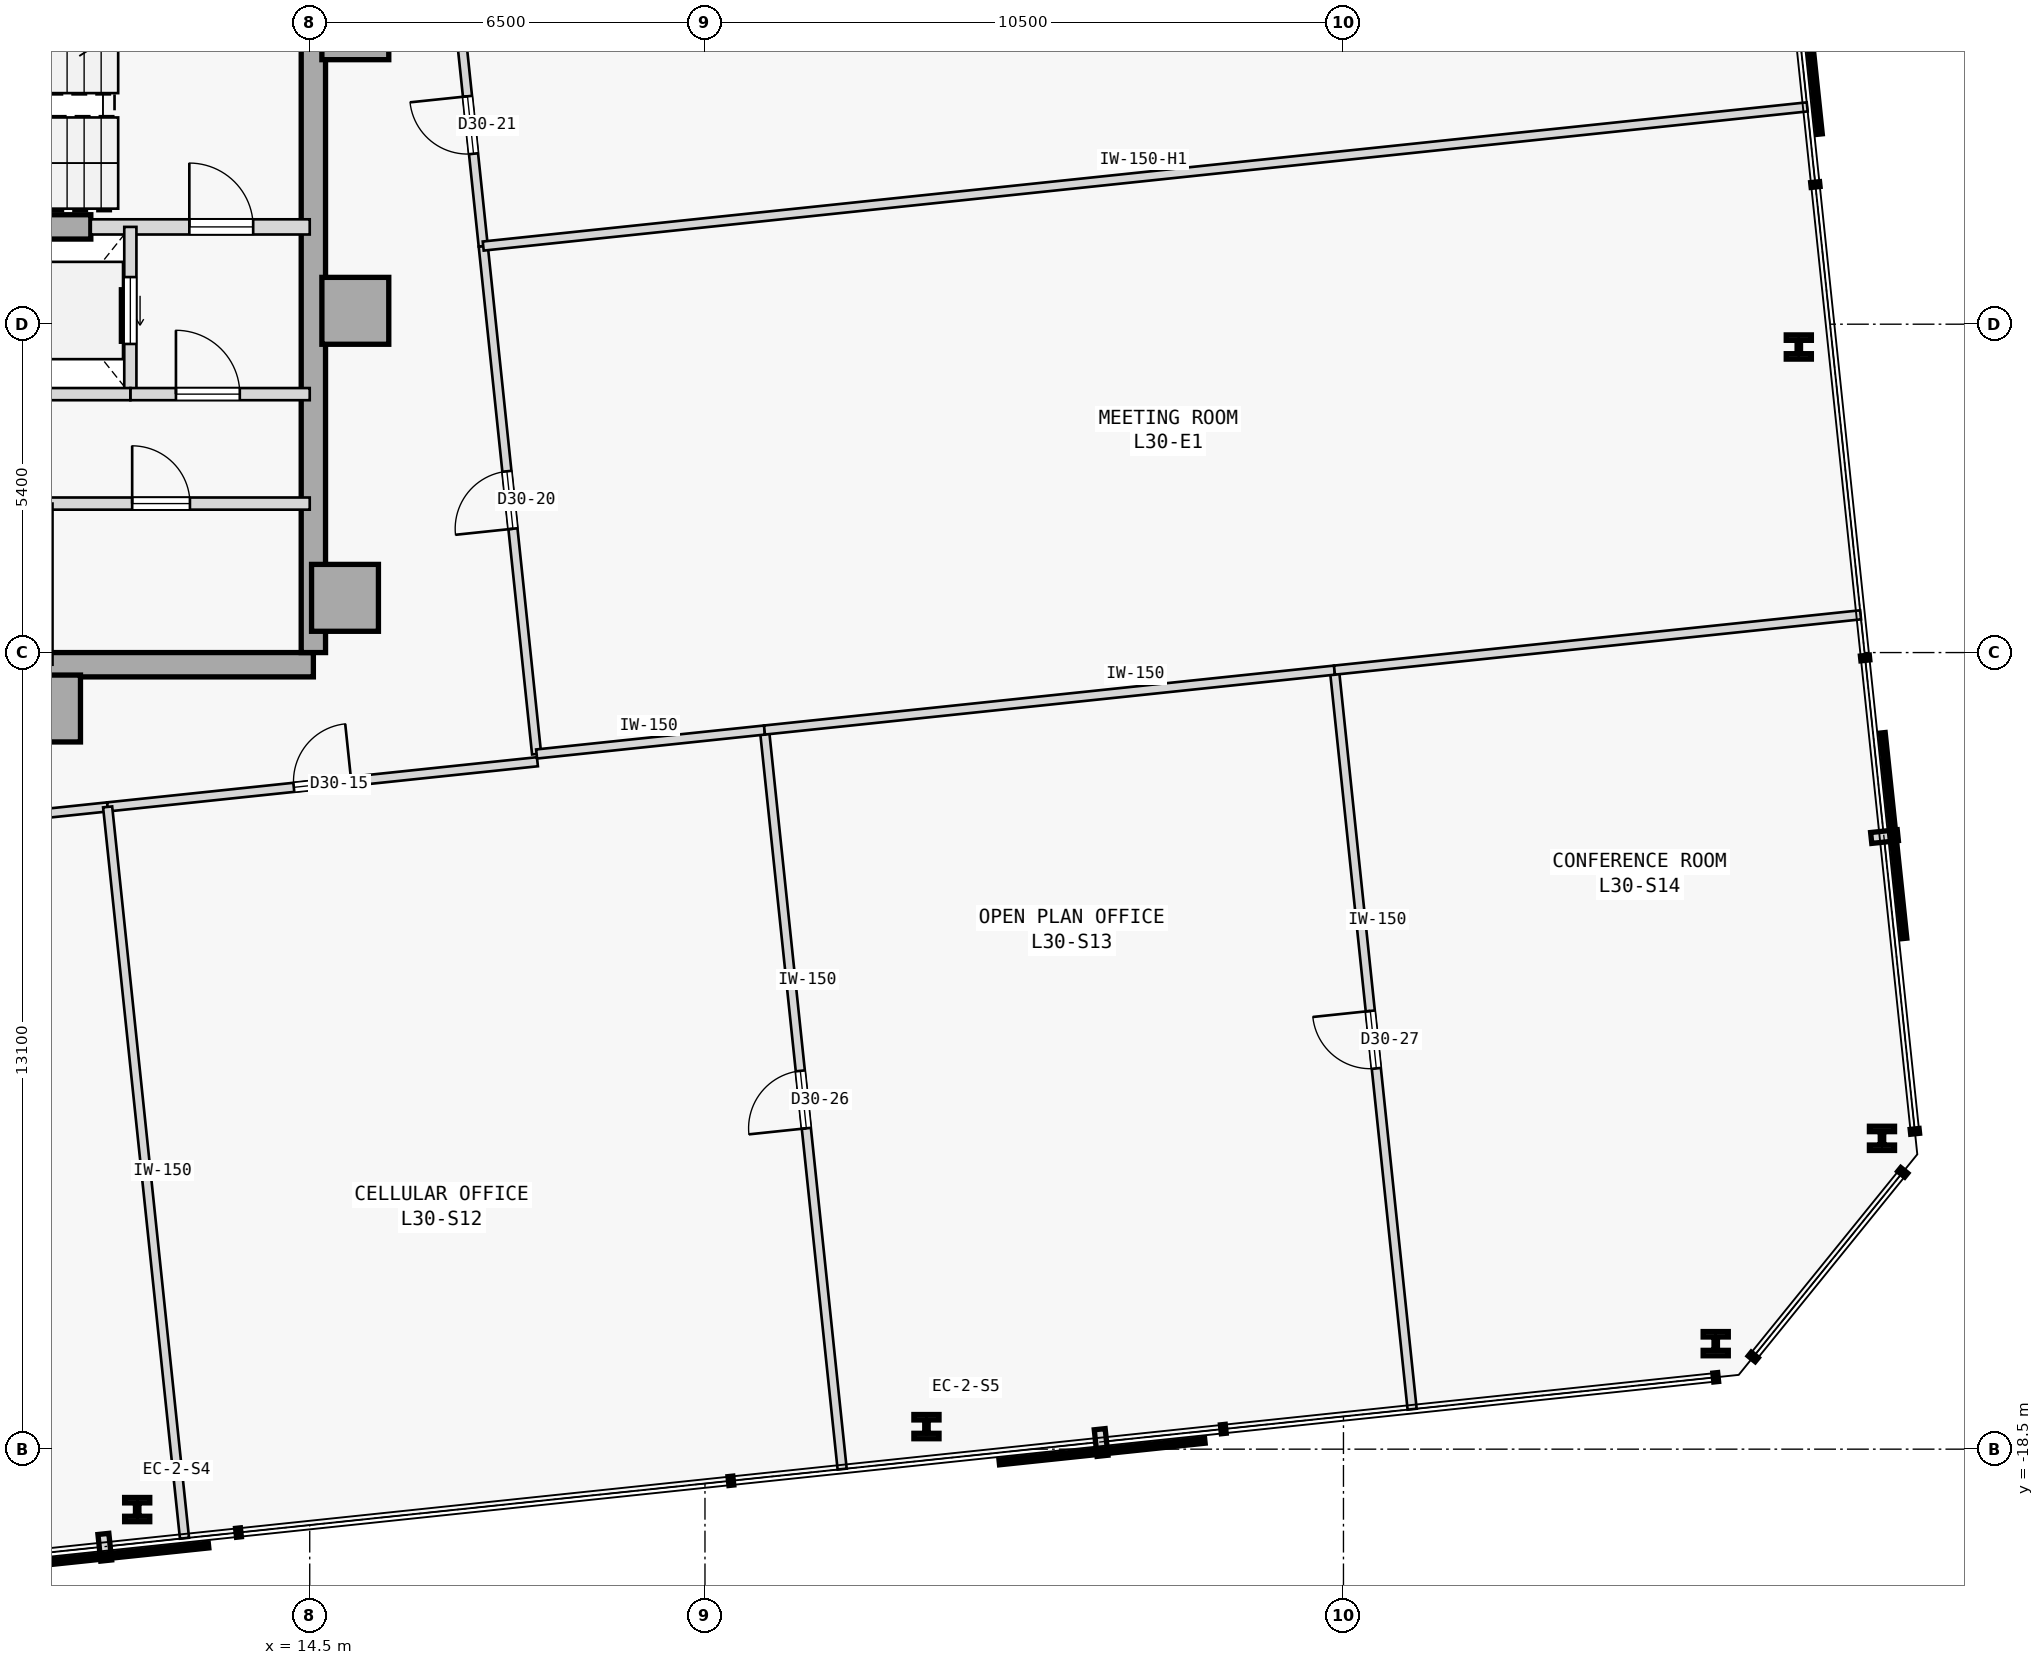
"""IFC4 building model, lengths in metres.
Left out: names, types, materials, properties, quantities, classifications, styles, units other than length and angle.
Written with IfcOpenShell. Run it as: python <this file> out.ifc"""

import sys

from ifc_helpers import new_model, si_unit, direction, frame, frame_2d, origin, origin_2d, place, context, subcontext, project, spatial, rectangle, i_section, extrude, element, fill, save


model = new_model("IFC4")
c1 = context("Model", 3, precision=1e-05, world=origin(), true_north=direction((0.0, 1.0)))
c2 = subcontext(c1, "Body", "Model", "MODEL_VIEW")
j1 = project(units=[si_unit("LENGTHUNIT", "METRE"), si_unit("PLANEANGLEUNIT", "RADIAN")], contexts=[c1])
p1 = place(None, origin())
s1 = spatial("IfcSite", under=j1, at=p1, CompositionType="ELEMENT")
p2 = place(p1, origin())
s2 = spatial("IfcBuilding", under=s1, at=p2, CompositionType="ELEMENT")
p3 = place(p2, frame((0.0, 0.0, 120.7)))
s3 = spatial("IfcBuildingStorey", under=s2, at=p3, CompositionType="ELEMENT", Elevation=120.7)
for number, where, z_axis, x_axis in (
    (1, (15.25, 4.9, 0.0), (0.0, 0.0, 1.0), (1.0, 0.0, 0.0)),
    (2, (15.25, 0.22, 0.0), (0.0, 0.0, 1.0), (1.0, 0.0, 0.0)),
    (3, (15.08, -4.5, 0.0), (0.0, 0.0, 1.0), (1.0, 0.0, 0.0)),
    (4, (10.18, -6.32, 0.0), (0.0, 0.0, 1.0), (1.0, 0.0, 0.0)),
):
    element("IfcColumn", number, at=place(p3, frame(where, z_axis=z_axis, x_axis=x_axis)), inside=s3, PredefinedType="COLUMN", context=c2, shape_type="SweptSolid", body=[
        extrude(rectangle(XDim=1.1, YDim=1.1, at=origin_2d()), origin(), (0.0, 0.0, 1.0), 3.7),
    ])
p4 = place(p3, frame((3.7, -5.6, 0.0), z_axis=(0.0, 0.0, 1.0), x_axis=(1.0, 0.0, 0.0)))
e5 = element("IfcWall", 5, at=p4, inside=s3, PredefinedType="SHEAR", context=c2, shape_type="SweptSolid", body=[
    extrude(rectangle(XDim=10.86, YDim=0.4, at=frame_2d((5.43, 0.0))), origin(), (0.0, 0.0, 1.0), 3.475),
])
p5 = place(p3, frame((14.56, -5.4, 0.0), z_axis=(0.0, 0.0, 1.0), x_axis=(0.0, 1.0, 0.0)))
e6 = element("IfcWall", 6, at=p5, inside=s3, PredefinedType="SHEAR", context=c2, shape_type="SweptSolid", body=[
    extrude(rectangle(XDim=10.8, YDim=0.4, at=frame_2d((5.4, 0.0))), origin(), (0.0, 0.0, 1.0), 3.475),
])
p6 = place(p3, frame((5.75, 1.6, 0.0), z_axis=(0.0, 0.0, 1.0), x_axis=(1.0, 0.0, 0.0)))
e7 = element("IfcWall", 7, at=p6, inside=s3, PredefinedType="SHEAR", context=c2, shape_type="SweptSolid", body=[
    extrude(rectangle(XDim=5.15, YDim=0.4, at=frame_2d((2.575, 0.0))), origin(), (0.0, 0.0, 1.0), 3.475),
])
for number, where, z_axis, x_axis in (
    (8, (11.663, -19.494, 0.0), (0.0, 0.0, 1.0), (1.0, 0.0, 0.0)),
    (9, (24.642, -18.129, 0.0), (0.0, 0.0, 1.0), (1.0, 0.0, 0.0)),
    (10, (37.622, -16.765, 0.0), (0.0, 0.0, 1.0), (1.0, 0.0, 0.0)),
    (11, (40.356, -13.389, 0.0), (0.0, 0.0, 1.0), (1.0, 0.0, 0.0)),
    (12, (38.988, -0.375, 0.0), (0.0, 0.0, 1.0), (1.0, 0.0, 0.0)),
):
    element("IfcColumn", number, at=place(p3, frame(where, z_axis=z_axis, x_axis=x_axis)), inside=s3, PredefinedType="COLUMN", context=c2, shape_type="SweptSolid", body=[
        extrude(i_section(OverallWidth=0.413, OverallDepth=0.398, WebThickness=0.056, FlangeThickness=0.089, FilletRadius=0.015, at=origin_2d()), origin(), (0.0, 0.0, 1.0), 3.7),
    ])
p7 = place(p3, frame((10.9, 1.6, 0.0), z_axis=(0.0, 0.0, 1.0), x_axis=(1.0, 0.0, 0.0)))
e13 = element("IfcWall", 13, at=p7, inside=s3, PredefinedType="STANDARD", context=c2, shape_type="SweptSolid", body=[
    extrude(rectangle(XDim=3.6, YDim=0.25, at=frame_2d((1.8, 0.0))), origin(), (0.0, 0.0, 1.0), 3.475),
])
p8 = place(p7, frame((1.62, 0.0, 0.0)))
e14 = element("IfcOpeningElement", 14, at=p8, cuts=e13, PredefinedType="OPENING", context=c2, shape_type="SweptSolid", body=[
    extrude(rectangle(XDim=1.05, YDim=2.15, at=frame_2d((0.525, 1.075))), frame((0.0, 0.135, 0.0), z_axis=(0.0, -1.0, 0.0), x_axis=(1.0, 0.0, 0.0)), (0.0, 0.0, 1.0), 0.27),
])
p9 = place(p3, frame((11.55, -1.15, 0.0), z_axis=(0.0, 0.0, 1.0), x_axis=(0.0, 1.0, 0.0)))
e15 = element("IfcWall", 15, at=p9, inside=s3, PredefinedType="STANDARD", context=c2, shape_type="SweptSolid", body=[
    extrude(rectangle(XDim=2.75, YDim=0.2, at=frame_2d((1.375, 0.0))), origin(), (0.0, 0.0, 1.0), 3.475),
])
p10 = place(p9, frame((0.825, 0.0, 0.0)))
e16 = element("IfcOpeningElement", 16, at=p10, cuts=e15, PredefinedType="OPENING", context=c2, shape_type="SweptSolid", body=[
    extrude(rectangle(XDim=1.1, YDim=2.15, at=frame_2d((0.55, 1.075))), frame((0.0, 0.11, 0.0), z_axis=(0.0, -1.0, 0.0), x_axis=(1.0, 0.0, 0.0)), (0.0, 0.0, 1.0), 0.22),
])
p11 = place(p3, frame((11.55, -1.15, 0.0), z_axis=(0.0, 0.0, 1.0), x_axis=(1.0, 0.0, 0.0)))
e17 = element("IfcWall", 17, at=p11, inside=s3, PredefinedType="STANDARD", context=c2, shape_type="SweptSolid", body=[
    extrude(rectangle(XDim=2.95, YDim=0.2, at=frame_2d((1.475, 0.0))), origin(), (0.0, 0.0, 1.0), 3.475),
])
p12 = place(p11, frame((0.75, 0.0, 0.0)))
e18 = element("IfcOpeningElement", 18, at=p12, cuts=e17, PredefinedType="OPENING", context=c2, shape_type="SweptSolid", body=[
    extrude(rectangle(XDim=1.05, YDim=2.18, at=frame_2d((0.525, 1.09))), frame((0.0, 0.11, 0.0), z_axis=(0.0, -1.0, 0.0), x_axis=(1.0, 0.0, 0.0)), (0.0, 0.0, 1.0), 0.22),
])
p13 = place(p3, frame((9.35, -1.15, 0.0), z_axis=(0.0, 0.0, 1.0), x_axis=(1.0, 0.0, 0.0)))
e19 = element("IfcWall", 19, at=p13, inside=s3, PredefinedType="STANDARD", context=c2, shape_type="SweptSolid", body=[
    extrude(rectangle(XDim=2.2, YDim=0.2, at=frame_2d((1.1, 0.0))), origin(), (0.0, 0.0, 1.0), 3.475),
])
p14 = place(p3, frame((3.7, -2.95, 0.0), z_axis=(0.0, 0.0, 1.0), x_axis=(1.0, 0.0, 0.0)))
e20 = element("IfcWall", 20, at=p14, inside=s3, PredefinedType="STANDARD", context=c2, shape_type="SweptSolid", body=[
    extrude(rectangle(XDim=10.8, YDim=0.2, at=frame_2d((5.4, 0.0))), origin(), (0.0, 0.0, 1.0), 3.475),
])
p15 = place(p14, frame((2.69, 0.0, 0.0)))
e21 = element("IfcOpeningElement", 21, at=p15, cuts=e20, PredefinedType="OPENING", context=c2, shape_type="SweptSolid", body=[
    extrude(rectangle(XDim=1.1, YDim=2.15, at=frame_2d((0.55, 1.075))), frame((0.0, 0.11, 0.0), z_axis=(0.0, -1.0, 0.0), x_axis=(1.0, 0.0, 0.0)), (0.0, 0.0, 1.0), 0.22),
])
p16 = place(p14, frame((4.85, 0.0, 0.0)))
e22 = element("IfcOpeningElement", 22, at=p16, cuts=e20, PredefinedType="OPENING", context=c2, shape_type="SweptSolid", body=[
    extrude(rectangle(XDim=1.1, YDim=2.15, at=frame_2d((0.55, 1.075))), frame((0.0, 0.11, 0.0), z_axis=(0.0, -1.0, 0.0), x_axis=(1.0, 0.0, 0.0)), (0.0, 0.0, 1.0), 0.22),
])
p17 = place(p14, frame((7.88, 0.0, 0.0)))
e23 = element("IfcOpeningElement", 23, at=p17, cuts=e20, PredefinedType="OPENING", context=c2, shape_type="SweptSolid", body=[
    extrude(rectangle(XDim=0.95, YDim=2.15, at=frame_2d((0.475, 1.075))), frame((0.0, 0.11, 0.0), z_axis=(0.0, -1.0, 0.0), x_axis=(1.0, 0.0, 0.0)), (0.0, 0.0, 1.0), 0.22),
])
p18 = place(p3, frame((-0.36, -9.151, 0.0), z_axis=(0.0, 0.0, 1.0), x_axis=(0.994520780406, 0.10453907088, 0.0)))
e24 = element("IfcWall", 24, at=p18, inside=s3, PredefinedType="PARTITIONING", context=c2, shape_type="SweptSolid", body=[
    extrude(rectangle(XDim=11.6, YDim=0.15, at=frame_2d((5.8, 0.0))), origin(), (0.0, 0.0, 1.0), 3.475),
])
p19 = place(p18, frame((5.325, 0.0, 0.0)))
e25 = element("IfcOpeningElement", 25, at=p19, cuts=e24, PredefinedType="OPENING", context=c2, shape_type="SweptSolid", body=[
    extrude(rectangle(XDim=0.95, YDim=2.15, at=frame_2d((0.475, 1.075))), frame((0.0, 0.085, 0.0), z_axis=(0.0, -1.0, 0.0), x_axis=(1.0, 0.0, 0.0)), (0.0, 0.0, 1.0), 0.17),
])
p20 = place(p3, frame((11.177, -7.938, 0.0), z_axis=(0.0, 0.0, 1.0), x_axis=(0.994525011473, 0.104498811264, 0.0)))
e26 = element("IfcWall", 26, at=p20, inside=s3, PredefinedType="PARTITIONING", context=c2, shape_type="SweptSolid", body=[
    extrude(rectangle(XDim=7.107, YDim=0.15, at=frame_2d((3.553, 0.0))), origin(), (0.0, 0.0, 1.0), 3.475),
])
p21 = place(p20, frame((3.079, 0.0, 0.0)))
e27 = element("IfcOpeningElement", 27, at=p21, cuts=e26, PredefinedType="OPENING", context=c2, shape_type="SweptSolid", body=[
    extrude(rectangle(XDim=0.95, YDim=2.15, at=frame_2d((0.475, 1.075))), frame((0.0, 0.085, 0.0), z_axis=(0.0, -1.0, 0.0), x_axis=(1.0, 0.0, 0.0)), (0.0, 0.0, 1.0), 0.17),
])
p22 = place(p3, frame((18.231, -7.068, 0.0), z_axis=(0.0, 0.0, 1.0), x_axis=(-0.104527419485, 0.994522005074, 0.0)))
e28 = element("IfcWall", 28, at=p22, inside=s3, PredefinedType="PARTITIONING", context=c2, shape_type="SweptSolid", body=[
    extrude(rectangle(XDim=8.399, YDim=0.15, at=frame_2d((4.199, 0.0))), origin(), (0.0, 0.0, 1.0), 3.475),
])
p23 = place(p22, frame((3.725, 0.0, 0.0)))
e29 = element("IfcOpeningElement", 29, at=p23, cuts=e28, PredefinedType="OPENING", context=c2, shape_type="SweptSolid", body=[
    extrude(rectangle(XDim=0.95, YDim=2.15, at=frame_2d((0.475, 1.075))), frame((0.0, 0.085, 0.0), z_axis=(0.0, -1.0, 0.0), x_axis=(1.0, 0.0, 0.0)), (0.0, 0.0, 1.0), 0.17),
])
p24 = place(p3, frame((17.353, 1.285, 0.0), z_axis=(0.0, 0.0, 1.0), x_axis=(-0.104524753323, 0.994522285292, 0.0)))
e30 = element("IfcWall", 30, at=p24, inside=s3, PredefinedType="PARTITIONING", context=c2, shape_type="SweptSolid", body=[
    extrude(rectangle(XDim=5.718, YDim=0.15, at=frame_2d((2.859, 0.0))), origin(), (0.0, 0.0, 1.0), 3.475),
])
p25 = place(p24, frame((1.526, 0.0, 0.0)))
e31 = element("IfcOpeningElement", 31, at=p25, cuts=e30, PredefinedType="OPENING", context=c2, shape_type="SweptSolid", body=[
    extrude(rectangle(XDim=0.95, YDim=2.15, at=frame_2d((0.475, 1.075))), frame((0.0, 0.085, 0.0), z_axis=(0.0, -1.0, 0.0), x_axis=(1.0, 0.0, 0.0)), (0.0, 0.0, 1.0), 0.17),
])
p26 = place(p3, frame((12.441, -19.965, 0.0), z_axis=(0.0, 0.0, 1.0), x_axis=(-0.104535555083, 0.994521149963, 0.0)))
e32 = element("IfcWall", 32, at=p26, inside=s3, PredefinedType="PARTITIONING", context=c2, shape_type="SweptSolid", body=[
    extrude(rectangle(XDim=12.093, YDim=0.15, at=frame_2d((6.046, 0.0))), origin(), (0.0, 0.0, 1.0), 3.475),
])
p27 = place(p3, frame((23.256, -18.828, 0.0), z_axis=(0.0, 0.0, 1.0), x_axis=(-0.104540236679, 0.994520657862, 0.0)))
e33 = element("IfcWall", 33, at=p27, inside=s3, PredefinedType="PARTITIONING", context=c2, shape_type="SweptSolid", body=[
    extrude(rectangle(XDim=12.221, YDim=0.15, at=frame_2d((6.11, 0.0))), origin(), (0.0, 0.0, 1.0), 3.475),
])
p28 = place(p27, frame((5.635, 0.0, 0.0)))
e34 = element("IfcOpeningElement", 34, at=p28, cuts=e33, PredefinedType="OPENING", context=c2, shape_type="SweptSolid", body=[
    extrude(rectangle(XDim=0.95, YDim=2.15, at=frame_2d((0.475, 1.075))), frame((0.0, 0.085, 0.0), z_axis=(0.0, -1.0, 0.0), x_axis=(1.0, 0.0, 0.0)), (0.0, 0.0, 1.0), 0.17),
])
p29 = place(p3, frame((18.231, -7.068, 0.0), z_axis=(0.0, 0.0, 1.0), x_axis=(0.99452354487, 0.10451276812, 0.0)))
e35 = element("IfcWall", 35, at=p29, inside=s3, PredefinedType="PARTITIONING", context=c2, shape_type="SweptSolid", body=[
    extrude(rectangle(XDim=3.768, YDim=0.15, at=frame_2d((1.884, 0.0))), origin(), (0.0, 0.0, 1.0), 3.475),
])
p30 = place(p3, frame((32.629, -17.843, 0.0), z_axis=(0.0, 0.0, 1.0), x_axis=(-0.104538159751, 0.994520876179, 0.0)))
e36 = element("IfcWall", 36, at=p30, inside=s3, PredefinedType="PARTITIONING", context=c2, shape_type="SweptSolid", body=[
    extrude(rectangle(XDim=12.221, YDim=0.15, at=frame_2d((6.111, 0.0))), origin(), (0.0, 0.0, 1.0), 3.475),
])
p31 = place(p30, frame((5.635, 0.0, 0.0)))
e37 = element("IfcOpeningElement", 37, at=p31, cuts=e36, PredefinedType="OPENING", context=c2, shape_type="SweptSolid", body=[
    extrude(rectangle(XDim=0.95, YDim=2.15, at=frame_2d((0.475, 1.075))), frame((0.0, 0.085, 0.0), z_axis=(0.0, -1.0, 0.0), x_axis=(1.0, 0.0, 0.0)), (0.0, 0.0, 1.0), 0.17),
])
p32 = place(p3, frame((21.979, -6.674, 0.0), z_axis=(0.0, 0.0, 1.0), x_axis=(0.994519921083, 0.10454724563, 0.0)))
e38 = element("IfcWall", 38, at=p32, inside=s3, PredefinedType="PARTITIONING", context=c2, shape_type="SweptSolid", body=[
    extrude(rectangle(XDim=9.425, YDim=0.15, at=frame_2d((4.712, 0.0))), origin(), (0.0, 0.0, 1.0), 3.475),
])
p33 = place(p3, frame((31.352, -5.689, 0.0), z_axis=(0.0, 0.0, 1.0), x_axis=(0.994521893041, 0.104528485415, 0.0)))
e39 = element("IfcWall", 39, at=p33, inside=s3, PredefinedType="PARTITIONING", context=c2, shape_type="SweptSolid", body=[
    extrude(rectangle(XDim=8.7, YDim=0.15, at=frame_2d((4.35, 0.0))), origin(), (0.0, 0.0, 1.0), 3.475),
])
p34 = place(p3, frame((17.353, 1.285, 0.0), z_axis=(0.0, 0.0, 1.0), x_axis=(0.994522365919, 0.104523986183, 0.0)))
e40 = element("IfcWall", 40, at=p34, inside=s3, PredefinedType="PARTITIONING", context=c2, shape_type="SweptSolid", body=[
    extrude(rectangle(XDim=21.893, YDim=0.15, at=frame_2d((10.946, 0.0))), origin(), (0.0, 0.0, 1.0), 3.025),
])
p35 = place(p8, origin())
e41 = element("IfcDoor", 41, at=p35, inside=s3, OperationType="SINGLE_SWING_LEFT", PredefinedType="DOOR", context=c2, shape_type="SweptSolid", body=[
    extrude(rectangle(XDim=1.05, YDim=2.15, at=frame_2d((0.525, 1.075))), frame((0.0, 0.025, 0.0), z_axis=(0.0, -1.0, 0.0), x_axis=(1.0, 0.0, 0.0)), (0.0, 0.0, 1.0), 0.05),
])
fill(e14, e41)
p36 = place(p12, origin())
e42 = element("IfcDoor", 42, at=p36, inside=s3, OperationType="SINGLE_SWING_LEFT", PredefinedType="DOOR", context=c2, shape_type="SweptSolid", body=[
    extrude(rectangle(XDim=1.05, YDim=2.18, at=frame_2d((0.525, 1.09))), frame((0.0, 0.025, 0.0), z_axis=(0.0, -1.0, 0.0), x_axis=(1.0, 0.0, 0.0)), (0.0, 0.0, 1.0), 0.05),
])
fill(e18, e42)
p37 = place(p10, origin())
e43 = element("IfcDoor", 43, at=p37, inside=s3, OperationType="SLIDING_TO_RIGHT", PredefinedType="DOOR", context=c2, shape_type="SweptSolid", body=[
    extrude(rectangle(XDim=1.1, YDim=2.15, at=frame_2d((0.55, 1.075))), frame((0.0, 0.025, 0.0), z_axis=(0.0, -1.0, 0.0), x_axis=(1.0, 0.0, 0.0)), (0.0, 0.0, 1.0), 0.05),
])
fill(e16, e43)
p38 = place(p17, origin())
e44 = element("IfcDoor", 44, at=p38, inside=s3, OperationType="SINGLE_SWING_LEFT", PredefinedType="DOOR", context=c2, shape_type="SweptSolid", body=[
    extrude(rectangle(XDim=0.95, YDim=2.15, at=frame_2d((0.475, 1.075))), frame((0.0, 0.025, 0.0), z_axis=(0.0, -1.0, 0.0), x_axis=(1.0, 0.0, 0.0)), (0.0, 0.0, 1.0), 0.05),
])
fill(e23, e44)
p39 = place(p21, origin())
e45 = element("IfcDoor", 45, at=p39, inside=s3, OperationType="SINGLE_SWING_RIGHT", PredefinedType="DOOR", context=c2, shape_type="SweptSolid", body=[
    extrude(rectangle(XDim=0.95, YDim=2.15, at=frame_2d((0.475, 1.075))), frame((0.0, 0.025, 0.0), z_axis=(0.0, -1.0, 0.0), x_axis=(1.0, 0.0, 0.0)), (0.0, 0.0, 1.0), 0.05),
])
fill(e27, e45)
p40 = place(p23, origin())
e46 = element("IfcDoor", 46, at=p40, inside=s3, OperationType="SINGLE_SWING_LEFT", PredefinedType="DOOR", context=c2, shape_type="SweptSolid", body=[
    extrude(rectangle(XDim=0.95, YDim=2.15, at=frame_2d((0.475, 1.075))), frame((0.0, 0.025, 0.0), z_axis=(0.0, -1.0, 0.0), x_axis=(1.0, 0.0, 0.0)), (0.0, 0.0, 1.0), 0.05),
])
fill(e29, e46)
p41 = place(p25, origin())
e47 = element("IfcDoor", 47, at=p41, inside=s3, OperationType="SINGLE_SWING_RIGHT", PredefinedType="DOOR", context=c2, shape_type="SweptSolid", body=[
    extrude(rectangle(XDim=0.95, YDim=2.15, at=frame_2d((0.475, 1.075))), frame((0.0, 0.025, 0.0), z_axis=(0.0, -1.0, 0.0), x_axis=(1.0, 0.0, 0.0)), (0.0, 0.0, 1.0), 0.05),
])
fill(e31, e47)
p42 = place(p28, origin())
e48 = element("IfcDoor", 48, at=p42, inside=s3, OperationType="SINGLE_SWING_LEFT", PredefinedType="DOOR", context=c2, shape_type="SweptSolid", body=[
    extrude(rectangle(XDim=0.95, YDim=2.15, at=frame_2d((0.475, 1.075))), frame((0.0, 0.025, 0.0), z_axis=(0.0, -1.0, 0.0), x_axis=(1.0, 0.0, 0.0)), (0.0, 0.0, 1.0), 0.05),
])
fill(e34, e48)
p43 = place(p31, origin())
e49 = element("IfcDoor", 49, at=p43, inside=s3, OperationType="SINGLE_SWING_RIGHT", PredefinedType="DOOR", context=c2, shape_type="SweptSolid", body=[
    extrude(rectangle(XDim=0.95, YDim=2.15, at=frame_2d((0.475, 1.075))), frame((0.0, 0.025, 0.0), z_axis=(0.0, -1.0, 0.0), x_axis=(1.0, 0.0, 0.0)), (0.0, 0.0, 1.0), 0.05),
])
fill(e37, e49)
save(model, sys.argv[1])
